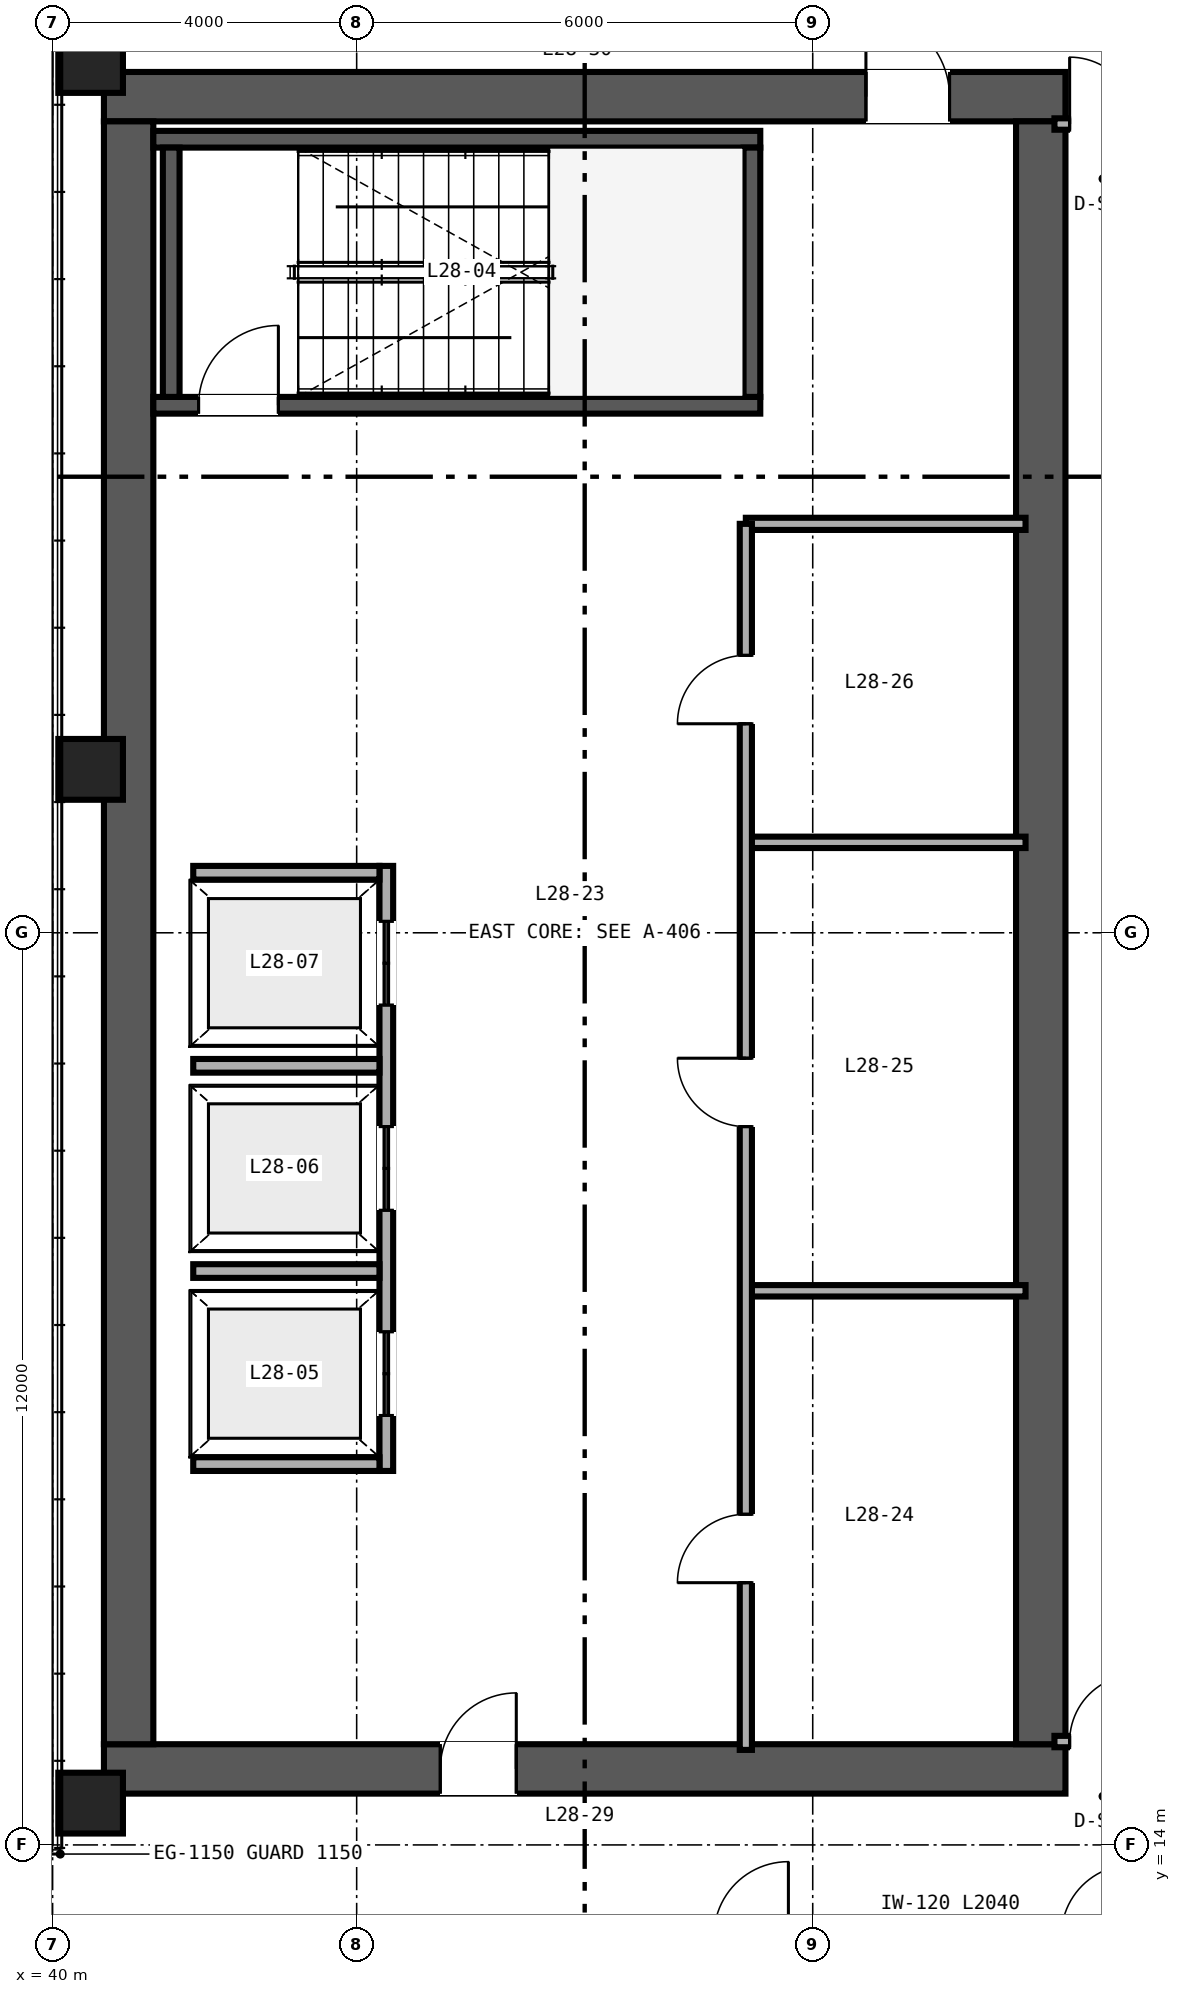
"""IFC4 building model, lengths in metres.
Left out: names, types, materials, properties, quantities, classifications, styles, units other than length and angle.
Written with IfcOpenShell. Run it as: python <this file> out.ifc"""

import sys

from ifc_helpers import new_model, si_unit, direction, frame, frame_2d, origin, origin_2d, place, context, subcontext, project, spatial, rectangle, hollow_rectangle, extrude, source, transform, mapped, element, fill, save


model = new_model("IFC4")
c1 = context("Model", 3, precision=1e-05, world=origin(), true_north=direction((0.0, 1.0)))
c2 = subcontext(c1, "Body", "Model", "MODEL_VIEW")
j1 = project(units=[si_unit("LENGTHUNIT", "METRE"), si_unit("PLANEANGLEUNIT", "RADIAN")], contexts=[c1])
p1 = place(None, origin())
s1 = spatial("IfcSite", under=j1, at=p1, CompositionType="ELEMENT")
p2 = place(p1, origin())
s2 = spatial("IfcBuilding", under=s1, at=p2, CompositionType="ELEMENT")
p3 = place(p2, frame((0.0, 0.0, 115.2)))
s3 = spatial("IfcBuildingStorey", under=s2, at=p3, CompositionType="ELEMENT", Elevation=115.2)
p4 = place(p3, frame((40.675, 15.0, 0.0), z_axis=(0.0, 0.0, 1.0), x_axis=(1.0, 0.0, 0.0)))
e1 = element("IfcWall", 1, at=p4, inside=s3, PredefinedType="SHEAR", context=c2, shape_type="SweptSolid", body=[
    extrude(rectangle(XDim=12.65, YDim=0.65, at=frame_2d((6.325, 0.0))), origin(), (0.0, 0.0, 1.0), 3.36),
])
p5 = place(p4, frame((4.425, 0.0, 0.0)))
e2 = element("IfcOpeningElement", 2, at=p5, cuts=e1, PredefinedType="OPENING", context=c2, shape_type="SweptSolid", body=[
    extrude(rectangle(XDim=1.0, YDim=2.15, at=frame_2d((0.5, 1.075))), frame((0.0, 0.335, 0.0), z_axis=(0.0, -1.0, 0.0), x_axis=(1.0, 0.0, 0.0)), (0.0, 0.0, 1.0), 0.67),
])
p6 = place(p3, frame((40.675, 37.0, 0.0), z_axis=(0.0, 0.0, 1.0), x_axis=(1.0, 0.0, 0.0)))
e3 = element("IfcWall", 3, at=p6, inside=s3, PredefinedType="SHEAR", context=c2, shape_type="SweptSolid", body=[
    extrude(rectangle(XDim=12.65, YDim=0.65, at=frame_2d((6.325, 0.0))), origin(), (0.0, 0.0, 1.0), 3.36),
])
p7 = place(p6, frame((10.025, 0.0, 0.0)))
e4 = element("IfcOpeningElement", 4, at=p7, cuts=e3, PredefinedType="OPENING", context=c2, shape_type="SweptSolid", body=[
    extrude(rectangle(XDim=1.1, YDim=2.15, at=frame_2d((0.55, 1.075))), frame((0.0, 0.335, 0.0), z_axis=(0.0, -1.0, 0.0), x_axis=(1.0, 0.0, 0.0)), (0.0, 0.0, 1.0), 0.67),
])
for number, where, z_axis, x_axis in (
    (5, (41.0, 15.325, 0.0), (0.0, 0.0, 1.0), (0.0, 1.0, 0.0)),
    (6, (53.0, 15.325, 0.0), (0.0, 0.0, 1.0), (0.0, 1.0, 0.0)),
):
    element("IfcWall", number, at=place(p3, frame(where, z_axis=z_axis, x_axis=x_axis)), inside=s3, PredefinedType="SHEAR", context=c2, shape_type="SweptSolid", body=[
        extrude(rectangle(XDim=21.35, YDim=0.65, at=frame_2d((10.675, 0.0))), origin(), (0.0, 0.0, 1.0), 3.36),
    ])
p8 = place(p3, frame((41.325, 32.94, 0.0), z_axis=(0.0, 0.0, 1.0), x_axis=(1.0, 0.0, 0.0)))
e7 = element("IfcWall", 7, at=p8, inside=s3, PredefinedType="SHEAR", context=c2, shape_type="SweptSolid", body=[
    extrude(rectangle(XDim=7.985, YDim=0.22, at=frame_2d((3.993, 0.0))), origin(), (0.0, 0.0, 1.0), 3.4),
])
p9 = place(p8, frame((0.595, 0.0, 0.0)))
e8 = element("IfcOpeningElement", 8, at=p9, cuts=e7, PredefinedType="OPENING", context=c2, shape_type="SweptSolid", body=[
    extrude(rectangle(XDim=1.05, YDim=2.15, at=frame_2d((0.525, 1.075))), frame((0.0, 0.12, 0.0), z_axis=(0.0, -1.0, 0.0), x_axis=(1.0, 0.0, 0.0)), (0.0, 0.0, 1.0), 0.24),
])
p10 = place(p3, frame((41.325, 36.44, 0.0), z_axis=(0.0, 0.0, 1.0), x_axis=(1.0, 0.0, 0.0)))
e9 = element("IfcWall", 9, at=p10, inside=s3, PredefinedType="SHEAR", context=c2, shape_type="SweptSolid", body=[
    extrude(rectangle(XDim=7.985, YDim=0.22, at=frame_2d((3.993, 0.0))), origin(), (0.0, 0.0, 1.0), 3.4),
])
for number, where, z_axis, x_axis in (
    (10, (41.56, 33.05, 0.0), (0.0, 0.0, 1.0), (0.0, 1.0, 0.0)),
    (11, (49.2, 33.05, 0.0), (0.0, 0.0, 1.0), (0.0, 1.0, 0.0)),
):
    element("IfcWall", number, at=place(p3, frame(where, z_axis=z_axis, x_axis=x_axis)), inside=s3, PredefinedType="SHEAR", context=c2, shape_type="SweptSolid", body=[
        extrude(rectangle(XDim=3.28, YDim=0.22, at=frame_2d((1.64, 0.0))), origin(), (0.0, 0.0, 1.0), 3.4),
    ])
m1 = source(origin(), c2, "Body", "SweptSolid", [
    extrude(hollow_rectangle(XDim=0.85, YDim=0.8, WallThickness=0.032, at=origin_2d()), origin(), (0.0, 0.0, 1.0), 3.36),
])
for number, where, z_axis, x_axis in (
    (12, (40.5, 14.55, 0.0), (0.0, 0.0, 1.0), (1.0, 0.0, 0.0)),
    (13, (40.5, 28.15, 0.0), (0.0, 0.0, 1.0), (1.0, 0.0, 0.0)),
    (14, (40.5, 37.45, 0.0), (0.0, 0.0, 1.0), (1.0, 0.0, 0.0)),
):
    element("IfcColumn", number, at=place(p3, frame(where, z_axis=z_axis, x_axis=x_axis)), inside=s3, PredefinedType="COLUMN", context=c2, shape_type="MappedRepresentation", body=[
        mapped(m1, transform((0.0, 0.0, 0.0), scale=1.0)),
    ])
p11 = place(p3, frame((44.39, 18.92, 0.0), z_axis=(0.0, 0.0, 1.0), x_axis=(0.0, 1.0, 0.0)))
e15 = element("IfcWall", 15, at=p11, inside=s3, PredefinedType="SOLIDWALL", context=c2, shape_type="SweptSolid", body=[
    extrude(rectangle(XDim=7.96, YDim=0.18, at=frame_2d((3.98, 0.0))), origin(), (0.0, 0.0, 1.0), 3.36),
])
p12 = place(p11, frame((0.73, 0.0, 0.0)))
e16 = element("IfcOpeningElement", 16, at=p12, cuts=e15, PredefinedType="OPENING", context=c2, shape_type="SweptSolid", body=[
    extrude(rectangle(XDim=1.1, YDim=2.2, at=frame_2d((0.55, 1.1))), frame((0.0, 0.1, 0.0), z_axis=(0.0, -1.0, 0.0), x_axis=(1.0, 0.0, 0.0)), (0.0, 0.0, 1.0), 0.2),
])
p13 = place(p11, frame((3.43, 0.0, 0.0)))
e17 = element("IfcOpeningElement", 17, at=p13, cuts=e15, PredefinedType="OPENING", context=c2, shape_type="SweptSolid", body=[
    extrude(rectangle(XDim=1.1, YDim=2.2, at=frame_2d((0.55, 1.1))), frame((0.0, 0.1, 0.0), z_axis=(0.0, -1.0, 0.0), x_axis=(1.0, 0.0, 0.0)), (0.0, 0.0, 1.0), 0.2),
])
p14 = place(p11, frame((6.13, 0.0, 0.0)))
e18 = element("IfcOpeningElement", 18, at=p14, cuts=e15, PredefinedType="OPENING", context=c2, shape_type="SweptSolid", body=[
    extrude(rectangle(XDim=1.1, YDim=2.2, at=frame_2d((0.55, 1.1))), frame((0.0, 0.1, 0.0), z_axis=(0.0, -1.0, 0.0), x_axis=(1.0, 0.0, 0.0)), (0.0, 0.0, 1.0), 0.2),
])
for number, where, z_axis, x_axis in (
    (19, (41.85, 19.01, 0.0), (0.0, 0.0, 1.0), (1.0, 0.0, 0.0)),
    (20, (41.85, 26.79, 0.0), (0.0, 0.0, 1.0), (1.0, 0.0, 0.0)),
    (21, (41.85, 21.55, 0.0), (0.0, 0.0, 1.0), (1.0, 0.0, 0.0)),
    (22, (41.85, 24.25, 0.0), (0.0, 0.0, 1.0), (1.0, 0.0, 0.0)),
):
    element("IfcWall", number, at=place(p3, frame(where, z_axis=z_axis, x_axis=x_axis)), inside=s3, PredefinedType="SOLIDWALL", context=c2, shape_type="SweptSolid", body=[
        extrude(rectangle(XDim=2.45, YDim=0.18, at=frame_2d((1.225, 0.0))), origin(), (0.0, 0.0, 1.0), 3.36),
    ])
p15 = place(p3, frame((49.12, 31.38, 0.0), z_axis=(0.0, 0.0, 1.0), x_axis=(1.0, 0.0, 0.0)))
e23 = element("IfcWall", 23, at=p15, inside=s3, PredefinedType="PARTITIONING", context=c2, shape_type="SweptSolid", body=[
    extrude(rectangle(XDim=3.68, YDim=0.16, at=frame_2d((1.84, 0.0))), origin(), (0.0, 0.0, 1.0), 2.36),
])
for number, where, z_axis, x_axis in (
    (24, (49.12, 21.29, 0.0), (0.0, 0.0, 1.0), (1.0, 0.0, 0.0)),
    (25, (49.12, 27.19, 0.0), (0.0, 0.0, 1.0), (1.0, 0.0, 0.0)),
):
    element("IfcWall", number, at=place(p3, frame(where, z_axis=z_axis, x_axis=x_axis)), inside=s3, PredefinedType="PARTITIONING", context=c2, shape_type="SweptSolid", body=[
        extrude(rectangle(XDim=3.68, YDim=0.15, at=frame_2d((1.84, 0.0))), origin(), (0.0, 0.0, 1.0), 3.36),
    ])
p16 = place(p3, frame((49.12, 15.25, 0.0), z_axis=(0.0, 0.0, 1.0), x_axis=(0.0, 1.0, 0.0)))
e26 = element("IfcWall", 26, at=p16, inside=s3, PredefinedType="PARTITIONING", context=c2, shape_type="SweptSolid", body=[
    extrude(rectangle(XDim=16.13, YDim=0.16, at=frame_2d((8.065, 0.0))), origin(), (0.0, 0.0, 1.0), 2.36),
])
p17 = place(p16, frame((2.2, 0.0, 0.0)))
e27 = element("IfcOpeningElement", 27, at=p17, cuts=e26, PredefinedType="OPENING", context=c2, shape_type="SweptSolid", body=[
    extrude(rectangle(XDim=0.9, YDim=2.15, at=frame_2d((0.45, 1.075))), frame((0.0, 0.09, 0.0), z_axis=(0.0, -1.0, 0.0), x_axis=(1.0, 0.0, 0.0)), (0.0, 0.0, 1.0), 0.18),
])
p18 = place(p16, frame((8.2, 0.0, 0.0)))
e28 = element("IfcOpeningElement", 28, at=p18, cuts=e26, PredefinedType="OPENING", context=c2, shape_type="SweptSolid", body=[
    extrude(rectangle(XDim=0.9, YDim=2.15, at=frame_2d((0.45, 1.075))), frame((0.0, 0.09, 0.0), z_axis=(0.0, -1.0, 0.0), x_axis=(1.0, 0.0, 0.0)), (0.0, 0.0, 1.0), 0.18),
])
p19 = place(p16, frame((13.5, 0.0, 0.0)))
e29 = element("IfcOpeningElement", 29, at=p19, cuts=e26, PredefinedType="OPENING", context=c2, shape_type="SweptSolid", body=[
    extrude(rectangle(XDim=0.9, YDim=2.15, at=frame_2d((0.45, 1.075))), frame((0.0, 0.09, 0.0), z_axis=(0.0, -1.0, 0.0), x_axis=(1.0, 0.0, 0.0)), (0.0, 0.0, 1.0), 0.18),
])
p20 = place(p3, frame((53.18, 15.36, 0.0), z_axis=(0.0, 0.0, 1.0), x_axis=(1.0, 0.0, 0.0)))
e30 = element("IfcWall", 30, at=p20, inside=s3, PredefinedType="PARTITIONING", context=c2, shape_type="SweptSolid", body=[
    extrude(rectangle(XDim=2.66, YDim=0.15, at=frame_2d((1.33, 0.0))), origin(), (0.0, 0.0, 1.0), 2.581),
])
p21 = place(p20, frame((0.2, 0.0, 0.0)))
e31 = element("IfcOpeningElement", 31, at=p21, cuts=e30, PredefinedType="OPENING", context=c2, shape_type="SweptSolid", body=[
    extrude(rectangle(XDim=0.88, YDim=2.15, at=frame_2d((0.44, 1.075))), frame((0.0, 0.085, 0.0), z_axis=(0.0, -1.0, 0.0), x_axis=(1.0, 0.0, 0.0)), (0.0, 0.0, 1.0), 0.17),
])
p22 = place(p3, frame((53.18, 36.64, 0.0), z_axis=(0.0, 0.0, 1.0), x_axis=(1.0, 0.0, 0.0)))
e32 = element("IfcWall", 32, at=p22, inside=s3, PredefinedType="PARTITIONING", context=c2, shape_type="SweptSolid", body=[
    extrude(rectangle(XDim=2.66, YDim=0.15, at=frame_2d((1.33, 0.0))), origin(), (0.0, 0.0, 1.0), 2.743),
])
p23 = place(p22, frame((0.2, 0.0, 0.0)))
e33 = element("IfcOpeningElement", 33, at=p23, cuts=e32, PredefinedType="OPENING", context=c2, shape_type="SweptSolid", body=[
    extrude(rectangle(XDim=0.88, YDim=2.15, at=frame_2d((0.44, 1.075))), frame((0.0, 0.085, 0.0), z_axis=(0.0, -1.0, 0.0), x_axis=(1.0, 0.0, 0.0)), (0.0, 0.0, 1.0), 0.17),
])
m2 = source(origin(), c2, "Body", "SweptSolid", [
    extrude(rectangle(XDim=1.05, YDim=2.15, at=frame_2d((0.525, 1.075))), frame((0.0, 0.025, 0.0), z_axis=(0.0, -1.0, 0.0), x_axis=(1.0, 0.0, 0.0)), (0.0, 0.0, 1.0), 0.05),
])
p24 = place(p9, origin())
e34 = element("IfcDoor", 34, at=p24, inside=s3, OperationType="SINGLE_SWING_RIGHT", PredefinedType="DOOR", context=c2, shape_type="MappedRepresentation", body=[
    mapped(m2, transform((0.0, 0.0, 0.0), scale=1.0)),
])
fill(e8, e34)
m3 = source(origin(), c2, "Body", "SweptSolid", [
    extrude(rectangle(XDim=1.1, YDim=2.2, at=frame_2d((0.55, 1.1))), frame((0.0, 0.025, 0.0), z_axis=(0.0, -1.0, 0.0), x_axis=(1.0, 0.0, 0.0)), (0.0, 0.0, 1.0), 0.05),
])
p25 = place(p12, origin())
e35 = element("IfcDoor", 35, at=p25, inside=s3, OperationType="DOUBLE_DOOR_SLIDING", PredefinedType="DOOR", context=c2, shape_type="MappedRepresentation", body=[
    mapped(m3, transform((0.0, 0.0, 0.0), scale=1.0)),
])
fill(e16, e35)
p26 = place(p13, origin())
e36 = element("IfcDoor", 36, at=p26, inside=s3, OperationType="DOUBLE_DOOR_SLIDING", PredefinedType="DOOR", context=c2, shape_type="MappedRepresentation", body=[
    mapped(m3, transform((0.0, 0.0, 0.0), scale=1.0)),
])
fill(e17, e36)
p27 = place(p14, origin())
e37 = element("IfcDoor", 37, at=p27, inside=s3, OperationType="DOUBLE_DOOR_SLIDING", PredefinedType="DOOR", context=c2, shape_type="MappedRepresentation", body=[
    mapped(m3, transform((0.0, 0.0, 0.0), scale=1.0)),
])
fill(e18, e37)
m4 = source(origin(), c2, "Body", "SweptSolid", [
    extrude(rectangle(XDim=1.0, YDim=2.15, at=frame_2d((0.5, 1.075))), frame((0.0, 0.025, 0.0), z_axis=(0.0, -1.0, 0.0), x_axis=(1.0, 0.0, 0.0)), (0.0, 0.0, 1.0), 0.05),
])
p28 = place(p5, origin())
e38 = element("IfcDoor", 38, at=p28, inside=s3, OperationType="SINGLE_SWING_RIGHT", PredefinedType="DOOR", context=c2, shape_type="MappedRepresentation", body=[
    mapped(m4, transform((0.0, 0.0, 0.0), scale=1.0)),
])
fill(e2, e38)
m5 = source(origin(), c2, "Body", "SweptSolid", [
    extrude(rectangle(XDim=1.1, YDim=2.15, at=frame_2d((0.55, 1.075))), frame((0.0, 0.025, 0.0), z_axis=(0.0, -1.0, 0.0), x_axis=(1.0, 0.0, 0.0)), (0.0, 0.0, 1.0), 0.05),
])
p29 = place(p7, origin())
e39 = element("IfcDoor", 39, at=p29, inside=s3, OperationType="SINGLE_SWING_LEFT", PredefinedType="DOOR", context=c2, shape_type="MappedRepresentation", body=[
    mapped(m5, transform((0.0, 0.0, 0.0), scale=1.0)),
])
fill(e4, e39)
m6 = source(origin(), c2, "Body", "SweptSolid", [
    extrude(rectangle(XDim=0.9, YDim=2.15, at=frame_2d((0.45, 1.075))), frame((0.0, 0.025, 0.0), z_axis=(0.0, -1.0, 0.0), x_axis=(1.0, 0.0, 0.0)), (0.0, 0.0, 1.0), 0.05),
])
p30 = place(p17, origin())
e40 = element("IfcDoor", 40, at=p30, inside=s3, OperationType="SINGLE_SWING_LEFT", PredefinedType="DOOR", context=c2, shape_type="MappedRepresentation", body=[
    mapped(m6, transform((0.0, 0.0, 0.0), scale=1.0)),
])
fill(e27, e40)
p31 = place(p18, origin())
e41 = element("IfcDoor", 41, at=p31, inside=s3, OperationType="SINGLE_SWING_RIGHT", PredefinedType="DOOR", context=c2, shape_type="MappedRepresentation", body=[
    mapped(m6, transform((0.0, 0.0, 0.0), scale=1.0)),
])
fill(e28, e41)
p32 = place(p19, origin())
e42 = element("IfcDoor", 42, at=p32, inside=s3, OperationType="SINGLE_SWING_LEFT", PredefinedType="DOOR", context=c2, shape_type="MappedRepresentation", body=[
    mapped(m6, transform((0.0, 0.0, 0.0), scale=1.0)),
])
fill(e29, e42)
m7 = source(origin(), c2, "Body", "SweptSolid", [
    extrude(rectangle(XDim=0.88, YDim=2.15, at=frame_2d((0.44, 1.075))), frame((0.0, 0.025, 0.0), z_axis=(0.0, -1.0, 0.0), x_axis=(1.0, 0.0, 0.0)), (0.0, 0.0, 1.0), 0.05),
])
p33 = place(p21, origin())
e43 = element("IfcDoor", 43, at=p33, inside=s3, OperationType="SINGLE_SWING_RIGHT", PredefinedType="DOOR", context=c2, shape_type="MappedRepresentation", body=[
    mapped(m7, transform((0.0, 0.0, 0.0), scale=1.0)),
])
fill(e31, e43)
p34 = place(p23, origin())
e44 = element("IfcDoor", 44, at=p34, inside=s3, OperationType="SINGLE_SWING_LEFT", PredefinedType="DOOR", context=c2, shape_type="MappedRepresentation", body=[
    mapped(m7, transform((0.0, 0.0, 0.0), scale=1.0)),
])
fill(e33, e44)
save(model, sys.argv[1])
